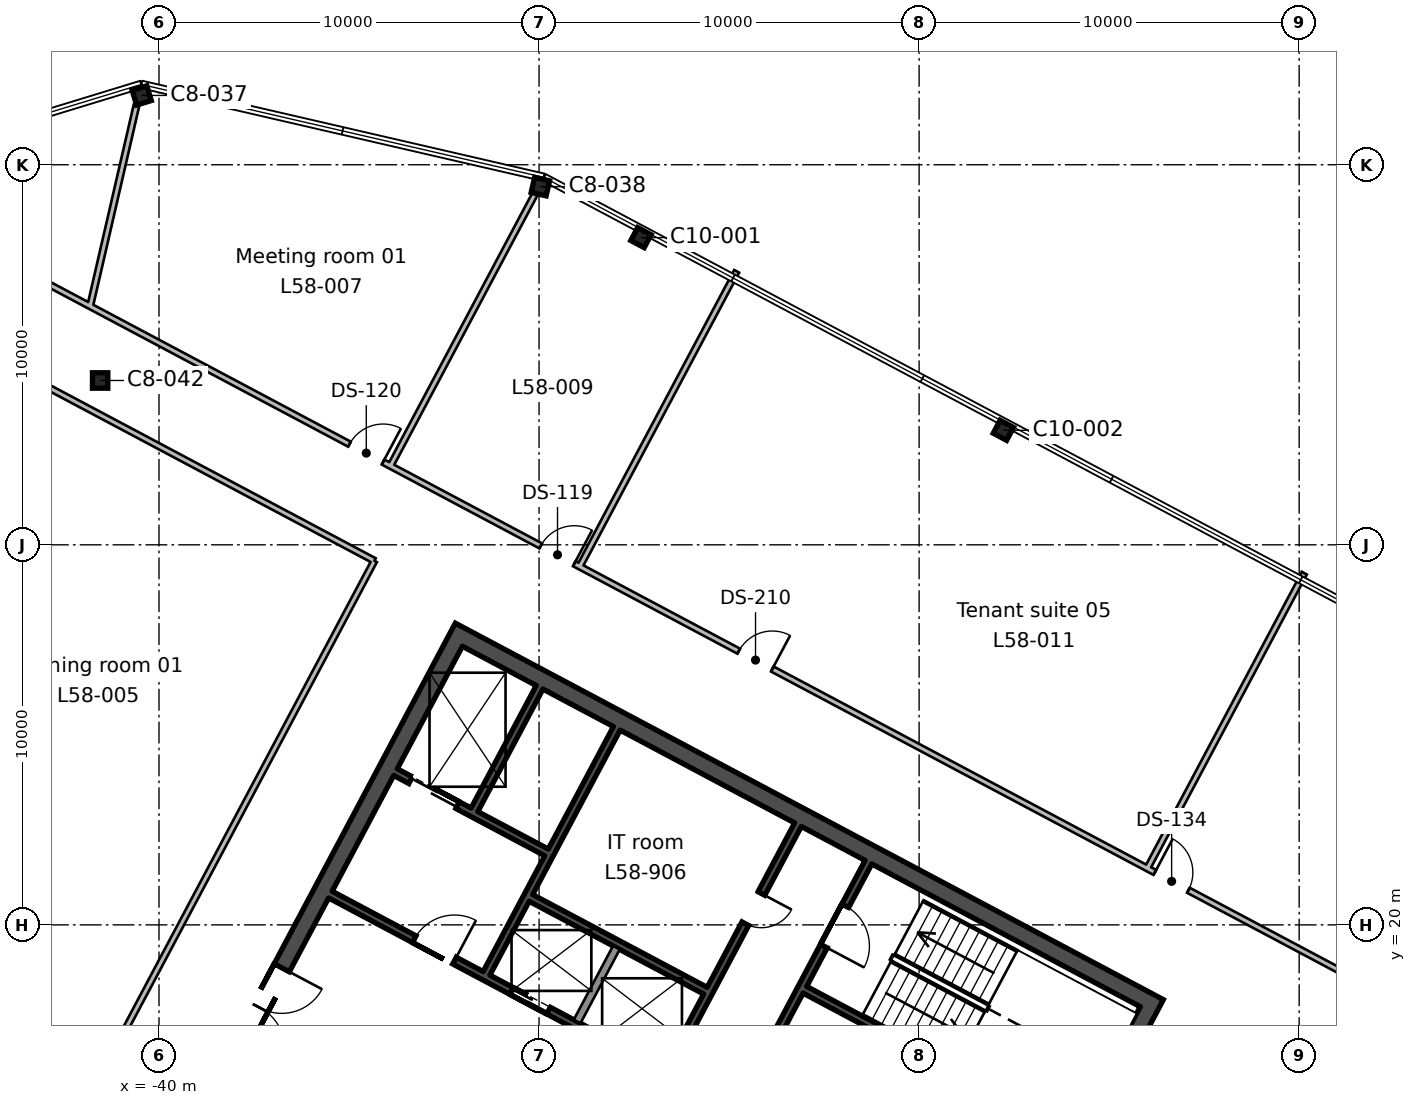
"""IFC4 building model, lengths in metres.
Left out: names, types, materials, properties, quantities, classifications, styles, units other than length and angle.
Written with IfcOpenShell. Run it as: python <this file> out.ifc"""

import sys

from ifc_helpers import new_model, si_unit, direction, frame, frame_2d, origin, origin_2d, place, context, subcontext, project, spatial, rectangle, i_section, extrude, element, fill, save


model = new_model("IFC4")
c1 = context("Model", 3, precision=1e-05, world=origin(), true_north=direction((0.0, 1.0)))
c2 = subcontext(c1, "Body", "Model", "MODEL_VIEW")
j1 = project(units=[si_unit("LENGTHUNIT", "METRE"), si_unit("PLANEANGLEUNIT", "RADIAN")], contexts=[c1])
p1 = place(None, origin())
s1 = spatial("IfcSite", under=j1, at=p1, CompositionType="ELEMENT")
p2 = place(p1, origin())
s2 = spatial("IfcBuilding", under=s1, at=p2, CompositionType="ELEMENT")
p3 = place(p2, frame((0.0, 0.0, 261.9)))
s3 = spatial("IfcBuildingStorey", under=s2, at=p3, CompositionType="ELEMENT", Elevation=261.9)
p4 = place(p3, frame((-17.783, 33.013, 0.0), z_axis=(0.0, 0.0, 1.0), x_axis=(-0.882947592859, 0.469471562786, 0.0)))
e1 = element("IfcColumn", 1, at=p4, inside=s3, PredefinedType="COLUMN", context=c2, shape_type="SweptSolid", body=[
    extrude(i_section(OverallWidth=0.399, OverallDepth=0.386, WebThickness=0.021, FlangeThickness=0.033, FilletRadius=0.015, at=origin_2d()), origin(), (0.0, 0.0, 1.0), 3.9),
])
p5 = place(p3, frame((-41.549, 34.324, 0.0), z_axis=(0.0, 0.0, 1.0), x_axis=(1.0, 0.0, 0.0)))
e2 = element("IfcColumn", 2, at=p5, inside=s3, PredefinedType="COLUMN", context=c2, shape_type="SweptSolid", body=[
    extrude(i_section(OverallWidth=0.404, OverallDepth=0.406, WebThickness=0.027, FlangeThickness=0.044, FilletRadius=0.015, at=origin_2d()), origin(), (0.0, 0.0, 1.0), 3.9),
])
p6 = place(p3, frame((-27.319, 38.083, 0.0), z_axis=(0.0, 0.0, 1.0), x_axis=(-0.882947592859, 0.469471562786, 0.0)))
e3 = element("IfcColumn", 3, at=p6, inside=s3, PredefinedType="COLUMN", context=c2, shape_type="SweptSolid", body=[
    extrude(i_section(OverallWidth=0.399, OverallDepth=0.386, WebThickness=0.021, FlangeThickness=0.033, FilletRadius=0.015, at=origin_2d()), origin(), (0.0, 0.0, 1.0), 3.9),
])
for number, where, z_axis, x_axis in (
    (4, (-29.965, 39.425, 0.0), (0.0, 0.0, 1.0), (-0.974, 0.225, 0.0)),
    (5, (-40.455, 41.824, 0.0), (0.0, 0.0, 1.0), (-0.956, -0.292, 0.0)),
):
    element("IfcColumn", number, at=place(p3, frame(where, z_axis=z_axis, x_axis=x_axis)), inside=s3, PredefinedType="COLUMN", context=c2, shape_type="SweptSolid", body=[
        extrude(i_section(OverallWidth=0.404, OverallDepth=0.406, WebThickness=0.027, FlangeThickness=0.044, FilletRadius=0.015, at=origin_2d()), origin(), (0.0, 0.0, 1.0), 3.9),
    ])
p7 = place(p3, frame((-13.771, 18.138, 0.0), z_axis=(0.0, 0.0, 1.0), x_axis=(-0.469467968382, -0.882949504028, 0.0)))
e6 = element("IfcWall", 6, at=p7, inside=s3, PredefinedType="SHEAR", context=c2, shape_type="SweptSolid", body=[
    extrude(rectangle(XDim=19.1, YDim=0.45, at=frame_2d((9.55, 0.0))), origin(), (0.0, 0.0, 1.0), 3.9),
])
p8 = place(p7, frame((6.55, 0.0, 0.0)))
e7 = element("IfcOpeningElement", 7, at=p8, cuts=e6, PredefinedType="OPENING", context=c2, shape_type="SweptSolid", body=[
    extrude(rectangle(XDim=2.4, YDim=2.4, at=frame_2d((1.2, 1.2))), frame((0.0, 0.235, 0.0), z_axis=(0.0, -1.0, 0.0), x_axis=(1.0, 0.0, 0.0)), (0.0, 0.0, 1.0), 0.47),
])
p9 = place(p3, frame((-32.004, 27.833, 0.0), z_axis=(0.0, 0.0, 1.0), x_axis=(-0.469467968382, -0.882949504028, 0.0)))
e8 = element("IfcWall", 8, at=p9, inside=s3, PredefinedType="SHEAR", context=c2, shape_type="SweptSolid", body=[
    extrude(rectangle(XDim=19.1, YDim=0.45, at=frame_2d((9.55, 0.0))), origin(), (0.0, 0.0, 1.0), 3.9),
])
p10 = place(p9, frame((10.15, 0.0, 0.0)))
e9 = element("IfcOpeningElement", 9, at=p10, cuts=e8, PredefinedType="OPENING", context=c2, shape_type="SweptSolid", body=[
    extrude(rectangle(XDim=2.4, YDim=2.4, at=frame_2d((1.2, 1.2))), frame((0.0, 0.235, 0.0), z_axis=(0.0, -1.0, 0.0), x_axis=(1.0, 0.0, 0.0)), (0.0, 0.0, 1.0), 0.47),
])
p11 = place(p3, frame((-14.076, 18.045, 0.0), z_axis=(0.0, 0.0, 1.0), x_axis=(-0.882947755831, 0.46947125628, 0.0)))
e10 = element("IfcWall", 10, at=p11, inside=s3, PredefinedType="SHEAR", context=c2, shape_type="SweptSolid", body=[
    extrude(rectangle(XDim=20.2, YDim=0.45, at=frame_2d((10.1, 0.0))), origin(), (0.0, 0.0, 1.0), 3.9),
])
p12 = place(p3, frame((-21.333, 21.649, 0.0), z_axis=(0.0, 0.0, 1.0), x_axis=(-0.469494272526, -0.882935517501, 0.0)))
e11 = element("IfcWall", 11, at=p12, inside=s3, PredefinedType="SHEAR", context=c2, shape_type="SweptSolid", body=[
    extrude(rectangle(XDim=7.3, YDim=0.2, at=frame_2d((3.65, 0.0))), origin(), (0.0, 0.0, 1.0), 3.9),
])
p13 = place(p12, frame((1.3, 0.0, 0.0)))
e12 = element("IfcOpeningElement", 12, at=p13, cuts=e11, PredefinedType="OPENING", context=c2, shape_type="SweptSolid", body=[
    extrude(rectangle(XDim=1.2, YDim=2.1, at=frame_2d((0.6, 1.05))), frame((0.0, 0.11, 0.0), z_axis=(0.0, -1.0, 0.0), x_axis=(1.0, 0.0, 0.0)), (0.0, 0.0, 1.0), 0.22),
])
p14 = place(p3, frame((-23.188, 22.635, 0.0), z_axis=(0.0, 0.0, 1.0), x_axis=(-0.469454336211, -0.882956752176, 0.0)))
e13 = element("IfcWall", 13, at=p14, inside=s3, PredefinedType="SHEAR", context=c2, shape_type="SweptSolid", body=[
    extrude(rectangle(XDim=7.3, YDim=0.2, at=frame_2d((3.65, 0.0))), origin(), (0.0, 0.0, 1.0), 3.9),
])
p15 = place(p14, frame((2.05, 0.0, 0.0)))
e14 = element("IfcOpeningElement", 14, at=p15, cuts=e13, PredefinedType="OPENING", context=c2, shape_type="SweptSolid", body=[
    extrude(rectangle(XDim=0.9, YDim=2.1, at=frame_2d((0.45, 1.05))), frame((0.0, 0.11, 0.0), z_axis=(0.0, -1.0, 0.0), x_axis=(1.0, 0.0, 0.0)), (0.0, 0.0, 1.0), 0.22),
])
p16 = place(p3, frame((-27.966, 19.4, 0.0), z_axis=(0.0, 0.0, 1.0), x_axis=(-0.4694473164, -0.882960484464, 0.0)))
e15 = element("IfcWall", 15, at=p16, inside=s3, PredefinedType="SOLIDWALL", context=c2, shape_type="SweptSolid", body=[
    extrude(rectangle(XDim=2.2, YDim=0.2, at=frame_2d((1.1, 0.0))), origin(), (0.0, 0.0, 1.0), 3.9),
])
p17 = place(p3, frame((-27.955, 25.171, 0.0), z_axis=(0.0, 0.0, 1.0), x_axis=(-0.469480409012, -0.88294288918, 0.0)))
e16 = element("IfcWall", 16, at=p17, inside=s3, PredefinedType="SHEAR", context=c2, shape_type="SweptSolid", body=[
    extrude(rectangle(XDim=7.3, YDim=0.2, at=frame_2d((3.65, 0.0))), origin(), (0.0, 0.0, 1.0), 3.9),
])
p18 = place(p3, frame((-29.986, 26.25, 0.0), z_axis=(0.0, 0.0, 1.0), x_axis=(-0.469494272526, -0.882935517501, 0.0)))
e17 = element("IfcWall", 17, at=p18, inside=s3, PredefinedType="SHEAR", context=c2, shape_type="SweptSolid", body=[
    extrude(rectangle(XDim=3.65, YDim=0.2, at=frame_2d((1.825, 0.0))), origin(), (0.0, 0.0, 1.0), 3.9),
])
p19 = place(p3, frame((-15.942, 14.536, 0.0), z_axis=(0.0, 0.0, 1.0), x_axis=(-0.882946947542, 0.469472776449, 0.0)))
e18 = element("IfcWall", 18, at=p19, inside=s3, PredefinedType="SHEAR", context=c2, shape_type="SweptSolid", body=[
    extrude(rectangle(XDim=8.0, YDim=0.2, at=frame_2d((4.0, 0.0))), origin(), (0.0, 0.0, 1.0), 3.9),
])
p20 = place(p3, frame((-29.804, 21.906, 0.0), z_axis=(0.0, 0.0, 1.0), x_axis=(-0.882960433586, 0.469447412093, 0.0)))
e19 = element("IfcWall", 19, at=p20, inside=s3, PredefinedType="SHEAR", context=c2, shape_type="SweptSolid", body=[
    extrude(rectangle(XDim=4.5, YDim=0.2, at=frame_2d((2.25, 0.0))), origin(), (0.0, 0.0, 1.0), 3.9),
])
p21 = place(p20, frame((2.65, 0.0, 0.0)))
e20 = element("IfcOpeningElement", 20, at=p21, cuts=e19, PredefinedType="OPENING", context=c2, shape_type="SweptSolid", body=[
    extrude(rectangle(XDim=1.4, YDim=2.4, at=frame_2d((0.7, 1.2))), frame((0.0, 0.11, 0.0), z_axis=(0.0, -1.0, 0.0), x_axis=(1.0, 0.0, 0.0)), (0.0, 0.0, 1.0), 0.22),
])
p22 = place(p3, frame((-25.623, 18.268, 0.0), z_axis=(0.0, 0.0, 1.0), x_axis=(-0.882953967957, 0.469459572775, 0.0)))
e21 = element("IfcWall", 21, at=p22, inside=s3, PredefinedType="SHEAR", context=c2, shape_type="SweptSolid", body=[
    extrude(rectangle(XDim=5.2, YDim=0.2, at=frame_2d((2.6, 0.0))), origin(), (0.0, 0.0, 1.0), 3.9),
])
p23 = place(p3, frame((-26.662, 16.102, 0.0), z_axis=(0.0, 0.0, 1.0), x_axis=(-0.882940221191, 0.469485426614, 0.0)))
e22 = element("IfcWall", 22, at=p23, inside=s3, PredefinedType="SHEAR", context=c2, shape_type="SweptSolid", body=[
    extrude(rectangle(XDim=10.0, YDim=0.2, at=frame_2d((5.0, 0.0))), origin(), (0.0, 0.0, 1.0), 3.9),
])
p24 = place(p23, frame((6.3, 0.0, 0.0)))
e23 = element("IfcOpeningElement", 23, at=p24, cuts=e22, PredefinedType="OPENING", context=c2, shape_type="SweptSolid", body=[
    extrude(rectangle(XDim=1.2, YDim=2.1, at=frame_2d((0.6, 1.05))), frame((0.0, 0.11, 0.0), z_axis=(0.0, -1.0, 0.0), x_axis=(1.0, 0.0, 0.0)), (0.0, 0.0, 1.0), 0.22),
])
p25 = place(p23, frame((0.8, 0.0, 0.0)))
e24 = element("IfcOpeningElement", 24, at=p25, cuts=e22, PredefinedType="OPENING", context=c2, shape_type="SweptSolid", body=[
    extrude(rectangle(XDim=1.1, YDim=2.1, at=frame_2d((0.55, 1.05))), frame((0.0, 0.11, 0.0), z_axis=(0.0, -1.0, 0.0), x_axis=(1.0, 0.0, 0.0)), (0.0, 0.0, 1.0), 0.22),
])
p26 = place(p23, frame((3.5, 0.0, 0.0)))
e25 = element("IfcOpeningElement", 25, at=p26, cuts=e22, PredefinedType="OPENING", context=c2, shape_type="SweptSolid", body=[
    extrude(rectangle(XDim=1.1, YDim=2.1, at=frame_2d((0.55, 1.05))), frame((0.0, 0.11, 0.0), z_axis=(0.0, -1.0, 0.0), x_axis=(1.0, 0.0, 0.0)), (0.0, 0.0, 1.0), 0.22),
])
p27 = place(p3, frame((-48.541, 39.854, 0.0), z_axis=(0.0, 0.0, 1.0), x_axis=(0.882945008423, -0.469476423372, 0.0)))
e26 = element("IfcWall", 26, at=p27, inside=s3, PredefinedType="PARTITIONING", context=c2, shape_type="SweptSolid", body=[
    extrude(rectangle(XDim=54.976, YDim=0.15, at=frame_2d((27.488, 0.0))), origin(), (0.0, 0.0, 1.0), 3.54),
])
p28 = place(p27, frame((50.65, 0.0, 0.0)))
e27 = element("IfcOpeningElement", 27, at=p28, cuts=e26, PredefinedType="OPENING", context=c2, shape_type="SweptSolid", body=[
    extrude(rectangle(XDim=1.8, YDim=2.1, at=frame_2d((0.9, 1.05))), frame((0.0, 0.085, 0.0), z_axis=(0.0, -1.0, 0.0), x_axis=(1.0, 0.0, 0.0)), (0.0, 0.0, 1.0), 0.17),
])
p29 = place(p27, frame((39.35, 0.0, 0.0)))
e28 = element("IfcOpeningElement", 28, at=p29, cuts=e26, PredefinedType="OPENING", context=c2, shape_type="SweptSolid", body=[
    extrude(rectangle(XDim=1.0, YDim=2.1, at=frame_2d((0.5, 1.05))), frame((0.0, 0.085, 0.0), z_axis=(0.0, -1.0, 0.0), x_axis=(1.0, 0.0, 0.0)), (0.0, 0.0, 1.0), 0.17),
])
p30 = place(p27, frame((26.95, 0.0, 0.0)))
e29 = element("IfcOpeningElement", 29, at=p30, cuts=e26, PredefinedType="OPENING", context=c2, shape_type="SweptSolid", body=[
    extrude(rectangle(XDim=1.0, YDim=2.1, at=frame_2d((0.5, 1.05))), frame((0.0, 0.085, 0.0), z_axis=(0.0, -1.0, 0.0), x_axis=(1.0, 0.0, 0.0)), (0.0, 0.0, 1.0), 0.17),
])
p31 = place(p27, frame((21.049, 0.0, 0.0)))
e30 = element("IfcOpeningElement", 30, at=p31, cuts=e26, PredefinedType="OPENING", context=c2, shape_type="SweptSolid", body=[
    extrude(rectangle(XDim=1.0, YDim=2.1, at=frame_2d((0.5, 1.05))), frame((0.0, 0.085, 0.0), z_axis=(0.0, -1.0, 0.0), x_axis=(1.0, 0.0, 0.0)), (0.0, 0.0, 1.0), 0.17),
])
p32 = place(p27, frame((15.35, 0.0, 0.0)))
e31 = element("IfcOpeningElement", 31, at=p32, cuts=e26, PredefinedType="OPENING", context=c2, shape_type="SweptSolid", body=[
    extrude(rectangle(XDim=1.0, YDim=2.1, at=frame_2d((0.5, 1.05))), frame((0.0, 0.085, 0.0), z_axis=(0.0, -1.0, 0.0), x_axis=(1.0, 0.0, 0.0)), (0.0, 0.0, 1.0), 0.17),
])
p33 = place(p3, frame((-42.984, 34.181, 0.0), z_axis=(0.0, 0.0, 1.0), x_axis=(0.882924032888, -0.469515869964, 0.0)))
e32 = element("IfcWall", 32, at=p33, inside=s3, PredefinedType="PARTITIONING", context=c2, shape_type="SweptSolid", body=[
    extrude(rectangle(XDim=9.799, YDim=0.15, at=frame_2d((4.899, 0.0))), origin(), (0.0, 0.0, 1.0), 3.54),
])
p34 = place(p3, frame((-34.332, 29.58, 0.0), z_axis=(0.0, 0.0, 1.0), x_axis=(-0.469446756585, -0.882960782103, 0.0)))
e33 = element("IfcWall", 33, at=p34, inside=s3, PredefinedType="PARTITIONING", context=c2, shape_type="SweptSolid", body=[
    extrude(rectangle(XDim=20.0, YDim=0.15, at=frame_2d((10.0, 0.0))), origin(), (0.0, 0.0, 1.0), 3.54),
])
p35 = place(p3, frame((-30.098, 39.247, 0.0), z_axis=(0.0, 0.0, 1.0), x_axis=(-0.469424042577, -0.882972858162, 0.0)))
e34 = element("IfcWall", 34, at=p35, inside=s3, PredefinedType="PARTITIONING", context=c2, shape_type="SweptSolid", body=[
    extrude(rectangle(XDim=8.123, YDim=0.15, at=frame_2d((4.062, 0.0))), origin(), (0.0, 0.0, 1.0), 3.54),
])
p36 = place(p3, frame((-41.813, 36.276, 0.0), z_axis=(0.0, 0.0, 1.0), x_axis=(0.224866064011, 0.974389682445, 0.0)))
e35 = element("IfcWall", 35, at=p36, inside=s3, PredefinedType="PARTITIONING", context=c2, shape_type="SweptSolid", body=[
    extrude(rectangle(XDim=5.438, YDim=0.15, at=frame_2d((2.719, 0.0))), origin(), (0.0, 0.0, 1.0), 3.54),
])
p37 = place(p3, frame((-24.8, 37.197, 0.0), z_axis=(0.0, 0.0, 1.0), x_axis=(-0.469510830369, -0.882926712794, 0.0)))
e36 = element("IfcWall", 36, at=p37, inside=s3, PredefinedType="PARTITIONING", context=c2, shape_type="SweptSolid", body=[
    extrude(rectangle(XDim=8.8, YDim=0.15, at=frame_2d((4.4, 0.0))), origin(), (0.0, 0.0, 1.0), 3.54),
])
p38 = place(p3, frame((-9.864, 29.255, 0.0), z_axis=(0.0, 0.0, 1.0), x_axis=(-0.469457446168, -0.882955098653, 0.0)))
e37 = element("IfcWall", 37, at=p38, inside=s3, PredefinedType="PARTITIONING", context=c2, shape_type="SweptSolid", body=[
    extrude(rectangle(XDim=8.8, YDim=0.15, at=frame_2d((4.4, 0.0))), origin(), (0.0, 0.0, 1.0), 3.54),
])
p39 = place(p10, origin())
e38 = element("IfcDoor", 38, at=p39, inside=s3, OperationType="DOUBLE_DOOR_SINGLE_SWING", PredefinedType="DOOR", context=c2, shape_type="SweptSolid", body=[
    extrude(rectangle(XDim=2.4, YDim=2.4, at=frame_2d((1.2, 1.2))), frame((0.0, 0.025, 0.0), z_axis=(0.0, -1.0, 0.0), x_axis=(1.0, 0.0, 0.0)), (0.0, 0.0, 1.0), 0.05),
])
fill(e9, e38)
p40 = place(p24, frame((1.2, 0.0, 0.0), z_axis=(0.0, 0.0, 1.0), x_axis=(-1.0, 0.0, 0.0)))
e39 = element("IfcDoor", 39, at=p40, inside=s3, OperationType="SINGLE_SWING_RIGHT", PredefinedType="DOOR", context=c2, shape_type="SweptSolid", body=[
    extrude(rectangle(XDim=1.2, YDim=2.1, at=frame_2d((0.6, 1.05))), frame((0.0, 0.025, 0.0), z_axis=(0.0, -1.0, 0.0), x_axis=(1.0, 0.0, 0.0)), (0.0, 0.0, 1.0), 0.05),
])
fill(e23, e39)
p41 = place(p13, origin())
e40 = element("IfcDoor", 40, at=p41, inside=s3, OperationType="SINGLE_SWING_RIGHT", PredefinedType="DOOR", context=c2, shape_type="SweptSolid", body=[
    extrude(rectangle(XDim=1.2, YDim=2.1, at=frame_2d((0.6, 1.05))), frame((0.0, 0.025, 0.0), z_axis=(0.0, -1.0, 0.0), x_axis=(1.0, 0.0, 0.0)), (0.0, 0.0, 1.0), 0.05),
])
fill(e12, e40)
p42 = place(p26, origin())
e41 = element("IfcDoor", 41, at=p42, inside=s3, OperationType="DOUBLE_DOOR_SLIDING", PredefinedType="DOOR", context=c2, shape_type="SweptSolid", body=[
    extrude(rectangle(XDim=1.1, YDim=2.1, at=frame_2d((0.55, 1.05))), frame((0.0, 0.025, 0.0), z_axis=(0.0, -1.0, 0.0), x_axis=(1.0, 0.0, 0.0)), (0.0, 0.0, 1.0), 0.05),
])
fill(e25, e41)
p43 = place(p21, origin())
e42 = element("IfcDoor", 42, at=p43, inside=s3, OperationType="DOUBLE_DOOR_SLIDING", PredefinedType="DOOR", context=c2, shape_type="SweptSolid", body=[
    extrude(rectangle(XDim=1.4, YDim=2.4, at=frame_2d((0.7, 1.2))), frame((0.0, 0.025, 0.0), z_axis=(0.0, -1.0, 0.0), x_axis=(1.0, 0.0, 0.0)), (0.0, 0.0, 1.0), 0.05),
])
fill(e20, e42)
p44 = place(p15, origin())
e43 = element("IfcDoor", 43, at=p44, inside=s3, OperationType="SINGLE_SWING_LEFT", PredefinedType="DOOR", context=c2, shape_type="SweptSolid", body=[
    extrude(rectangle(XDim=0.9, YDim=2.1, at=frame_2d((0.45, 1.05))), frame((0.0, 0.025, 0.0), z_axis=(0.0, -1.0, 0.0), x_axis=(1.0, 0.0, 0.0)), (0.0, 0.0, 1.0), 0.05),
])
fill(e14, e43)
p45 = place(p29, origin())
e44 = element("IfcDoor", 44, at=p45, inside=s3, OperationType="SINGLE_SWING_LEFT", PredefinedType="DOOR", context=c2, shape_type="SweptSolid", body=[
    extrude(rectangle(XDim=1.0, YDim=2.1, at=frame_2d((0.5, 1.05))), frame((0.0, 0.025, 0.0), z_axis=(0.0, -1.0, 0.0), x_axis=(1.0, 0.0, 0.0)), (0.0, 0.0, 1.0), 0.05),
])
fill(e28, e44)
p46 = place(p30, origin())
e45 = element("IfcDoor", 45, at=p46, inside=s3, OperationType="SINGLE_SWING_RIGHT", PredefinedType="DOOR", context=c2, shape_type="SweptSolid", body=[
    extrude(rectangle(XDim=1.0, YDim=2.1, at=frame_2d((0.5, 1.05))), frame((0.0, 0.025, 0.0), z_axis=(0.0, -1.0, 0.0), x_axis=(1.0, 0.0, 0.0)), (0.0, 0.0, 1.0), 0.05),
])
fill(e29, e45)
p47 = place(p31, origin())
e46 = element("IfcDoor", 46, at=p47, inside=s3, OperationType="SINGLE_SWING_RIGHT", PredefinedType="DOOR", context=c2, shape_type="SweptSolid", body=[
    extrude(rectangle(XDim=1.0, YDim=2.1, at=frame_2d((0.5, 1.05))), frame((0.0, 0.025, 0.0), z_axis=(0.0, -1.0, 0.0), x_axis=(1.0, 0.0, 0.0)), (0.0, 0.0, 1.0), 0.05),
])
fill(e30, e46)
p48 = place(p32, origin())
e47 = element("IfcDoor", 47, at=p48, inside=s3, OperationType="SINGLE_SWING_RIGHT", PredefinedType="DOOR", context=c2, shape_type="SweptSolid", body=[
    extrude(rectangle(XDim=1.0, YDim=2.1, at=frame_2d((0.5, 1.05))), frame((0.0, 0.025, 0.0), z_axis=(0.0, -1.0, 0.0), x_axis=(1.0, 0.0, 0.0)), (0.0, 0.0, 1.0), 0.05),
])
fill(e31, e47)
save(model, sys.argv[1])
